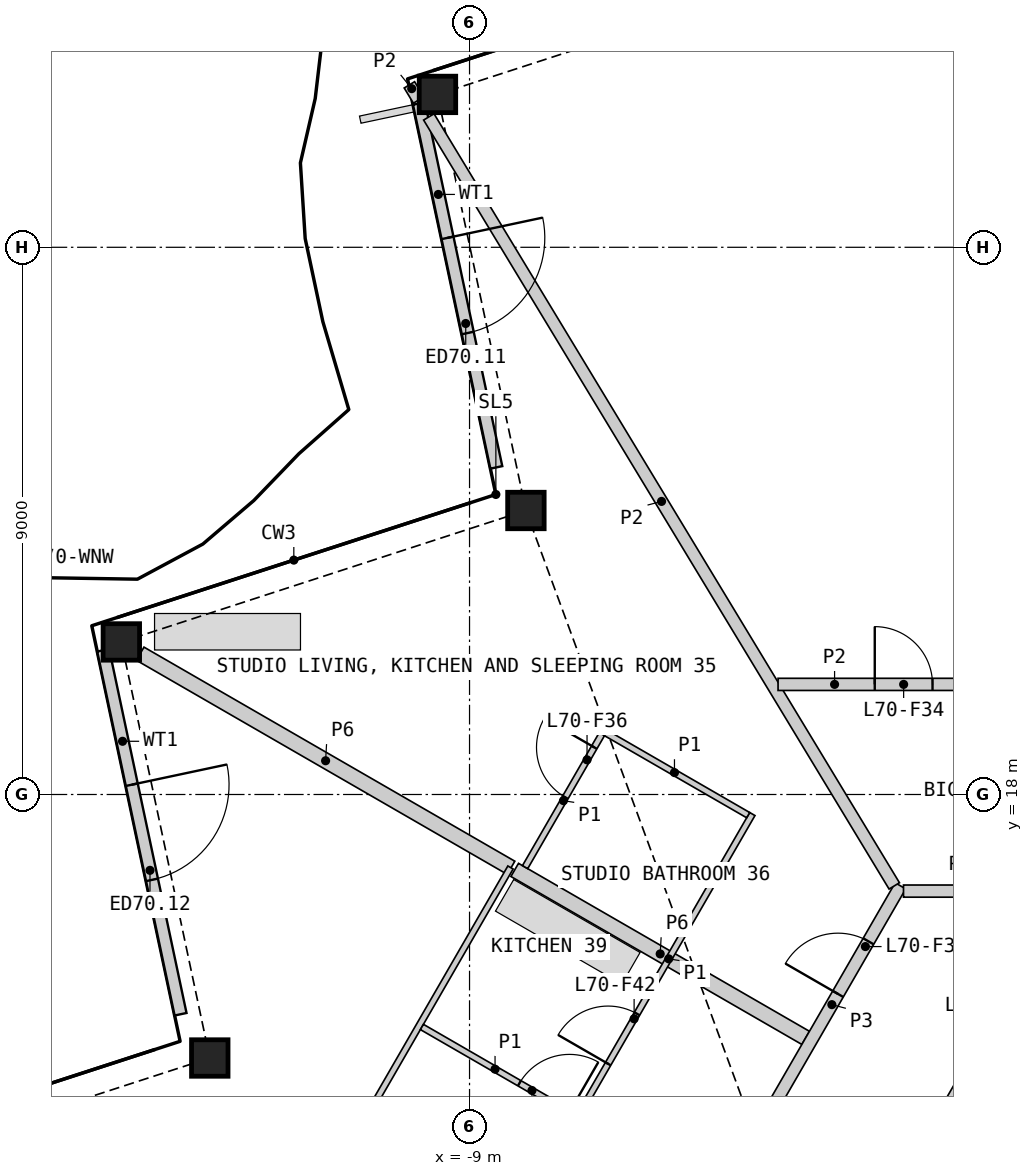
"""IFC4 building model, lengths in metres.
Left out: names, types, materials, properties, quantities, classifications, styles, units other than length and angle.
Written with IfcOpenShell. Run it as: python <this file> out.ifc"""

import sys

from ifc_helpers import new_model, si_unit, direction, frame, frame_2d, origin, origin_2d, place, context, subcontext, project, spatial, rectangle, hollow_rectangle, extrude, element, fill, save


model = new_model("IFC4")
c1 = context("Model", 3, precision=1e-05, world=origin(), true_north=direction((0.0, 1.0)))
c2 = subcontext(c1, "Body", "Model", "MODEL_VIEW")
j1 = project(units=[si_unit("LENGTHUNIT", "METRE"), si_unit("PLANEANGLEUNIT", "RADIAN")], contexts=[c1])
p1 = place(None, origin())
s1 = spatial("IfcSite", under=j1, at=p1, CompositionType="ELEMENT")
p2 = place(p1, origin())
s2 = spatial("IfcBuilding", under=s1, at=p2, CompositionType="ELEMENT")
p3 = place(p2, frame((0.0, 0.0, 318.8)))
s3 = spatial("IfcBuildingStorey", under=s2, at=p3, CompositionType="ELEMENT", Elevation=318.8)
for number, where, z_axis, x_axis in (
    (1, (-9.527, 29.514, 0.0), (0.0, 0.0, 1.0), (1.0, 0.0, 0.0)),
    (2, (-8.073, 22.671, 0.0), (0.0, 0.0, 1.0), (1.0, 0.0, 0.0)),
    (3, (-14.727, 20.509, 0.0), (0.0, 0.0, 1.0), (1.0, 0.0, 0.0)),
    (4, (-13.272, 13.666, 0.0), (0.0, 0.0, 1.0), (1.0, 0.0, 0.0)),
):
    element("IfcColumn", number, at=place(p3, frame(where, z_axis=z_axis, x_axis=x_axis)), inside=s3, PredefinedType="COLUMN", context=c2, shape_type="SweptSolid", body=[
        extrude(hollow_rectangle(XDim=0.6, YDim=0.6, WallThickness=0.04, at=origin_2d()), origin(), (0.0, 0.0, 1.0), 3.4),
    ])
p4 = place(p3, frame((-9.832, 29.366, 0.0), z_axis=(0.0, 0.0, 1.0), x_axis=(0.207932234858, -0.978143233738, 0.0)))
e5 = element("IfcWall", 5, at=p4, inside=s3, PredefinedType="SOLIDWALL", context=c2, shape_type="SweptSolid", body=[
    extrude(rectangle(XDim=6.12, YDim=0.2, at=frame_2d((3.06, 0.0))), origin(), (0.0, 0.0, 1.0), 2.488),
])
p5 = place(p4, frame((2.26, 0.0, 0.0)))
e6 = element("IfcOpeningElement", 6, at=p5, cuts=e5, PredefinedType="OPENING", context=c2, shape_type="SweptSolid", body=[
    extrude(rectangle(XDim=1.6, YDim=2.25, at=frame_2d((0.8, 1.125))), frame((0.0, 0.11, 0.0), z_axis=(0.0, -1.0, 0.0), x_axis=(1.0, 0.0, 0.0)), (0.0, 0.0, 1.0), 0.22),
])
p6 = place(p3, frame((-15.025, 20.372, 0.0), z_axis=(0.0, 0.0, 1.0), x_axis=(0.207932234858, -0.978143233738, 0.0)))
e7 = element("IfcWall", 7, at=p6, inside=s3, PredefinedType="SOLIDWALL", context=c2, shape_type="SweptSolid", body=[
    extrude(rectangle(XDim=6.12, YDim=0.2, at=frame_2d((3.06, 0.0))), origin(), (0.0, 0.0, 1.0), 2.488),
])
p7 = place(p6, frame((2.26, 0.0, 0.0)))
e8 = element("IfcOpeningElement", 8, at=p7, cuts=e7, PredefinedType="OPENING", context=c2, shape_type="SweptSolid", body=[
    extrude(rectangle(XDim=1.6, YDim=2.25, at=frame_2d((0.8, 1.125))), frame((0.0, 0.11, 0.0), z_axis=(0.0, -1.0, 0.0), x_axis=(1.0, 0.0, 0.0)), (0.0, 0.0, 1.0), 0.22),
])
p8 = place(p3, frame((-0.26, 13.961, 0.0), z_axis=(0.0, 0.0, 1.0), x_axis=(-0.49997936161, -0.866037319036, 0.0)))
e9 = element("IfcWall", 9, at=p8, inside=s3, PredefinedType="SHEAR", context=c2, shape_type="SweptSolid", body=[
    extrude(rectangle(XDim=2.66, YDim=0.6, at=frame_2d((1.33, 0.0))), origin(), (0.0, 0.0, 1.0), 3.1),
])
p9 = place(p8, frame((1.05, 0.0, 0.0)))
e10 = element("IfcOpeningElement", 10, at=p9, cuts=e9, PredefinedType="OPENING", context=c2, shape_type="SweptSolid", body=[
    extrude(rectangle(XDim=1.0, YDim=2.1, at=frame_2d((0.5, 1.05))), frame((0.0, 0.31, 0.0), z_axis=(0.0, -1.0, 0.0), x_axis=(1.0, 0.0, 0.0)), (0.0, 0.0, 1.0), 0.62),
])
p10 = place(p3, frame((-14.417, 20.316, 0.0), z_axis=(0.0, 0.0, 1.0), x_axis=(0.866022207469, -0.50000553614, 0.0)))
e11 = element("IfcWall", 11, at=p10, inside=s3, PredefinedType="PARTITIONING", context=c2, shape_type="SweptSolid", body=[
    extrude(rectangle(XDim=7.042, YDim=0.25, at=frame_2d((3.521, 0.0))), origin(), (0.0, 0.0, 1.0), 2.33),
])
p11 = place(p3, frame((-8.257, 16.76, 0.0), z_axis=(0.0, 0.0, 1.0), x_axis=(0.866034739526, -0.499983829672, 0.0)))
e12 = element("IfcWall", 12, at=p11, inside=s3, PredefinedType="PARTITIONING", context=c2, shape_type="SweptSolid", body=[
    extrude(rectangle(XDim=5.525, YDim=0.25, at=frame_2d((2.763, 0.0))), origin(), (0.0, 0.0, 1.0), 2.33),
])
p12 = place(p3, frame((-4.169, 12.59, 0.0), z_axis=(0.0, 0.0, 1.0), x_axis=(0.499950370306, 0.866054055606, 0.0)))
e13 = element("IfcWall", 13, at=p12, inside=s3, PredefinedType="PARTITIONING", context=c2, shape_type="SweptSolid", body=[
    extrude(rectangle(XDim=4.513, YDim=0.2, at=frame_2d((2.256, 0.0))), origin(), (0.0, 0.0, 1.0), 3.1),
])
p13 = place(p12, frame((2.459, 0.0, 0.0)))
e14 = element("IfcOpeningElement", 14, at=p13, cuts=e13, PredefinedType="OPENING", context=c2, shape_type="SweptSolid", body=[
    extrude(rectangle(XDim=1.0, YDim=2.1, at=frame_2d((0.5, 1.05))), frame((0.0, 0.11, 0.0), z_axis=(0.0, -1.0, 0.0), x_axis=(1.0, 0.0, 0.0)), (0.0, 0.0, 1.0), 0.22),
])
p14 = place(p3, frame((-1.863, 16.411, 0.0), z_axis=(0.0, 0.0, 1.0), x_axis=(1.0, 0.0, 0.0)))
e15 = element("IfcWall", 15, at=p14, inside=s3, PredefinedType="PARTITIONING", context=c2, shape_type="SweptSolid", body=[
    extrude(rectangle(XDim=3.726, YDim=0.2, at=frame_2d((1.863, 0.0))), origin(), (0.0, 0.0, 1.0), 3.1),
])
p15 = place(p14, frame((1.388, 0.0, 0.0)))
e16 = element("IfcOpeningElement", 16, at=p15, cuts=e15, PredefinedType="OPENING", context=c2, shape_type="SweptSolid", body=[
    extrude(rectangle(XDim=0.95, YDim=2.1, at=frame_2d((0.475, 1.05))), frame((0.0, 0.11, 0.0), z_axis=(0.0, -1.0, 0.0), x_axis=(1.0, 0.0, 0.0)), (0.0, 0.0, 1.0), 0.22),
])
p16 = place(p3, frame((-9.669, 29.144, 0.0), z_axis=(0.0, 0.0, 1.0), x_axis=(0.517770554559, -0.85551952218, 0.0)))
e17 = element("IfcWall", 17, at=p16, inside=s3, PredefinedType="PARTITIONING", context=c2, shape_type="SweptSolid", body=[
    extrude(rectangle(XDim=14.784, YDim=0.2, at=frame_2d((7.392, 0.0))), origin(), (0.0, 0.0, 1.0), 2.33),
])
p17 = place(p3, frame((-3.926, 19.811, 0.0), z_axis=(0.0, 0.0, 1.0), x_axis=(1.0, 0.0, 0.0)))
e18 = element("IfcWall", 18, at=p17, inside=s3, PredefinedType="PARTITIONING", context=c2, shape_type="SweptSolid", body=[
    extrude(rectangle(XDim=3.718, YDim=0.2, at=frame_2d((1.859, 0.0))), origin(), (0.0, 0.0, 1.0), 2.33),
])
p18 = place(p17, frame((1.59, 0.0, 0.0)))
e19 = element("IfcOpeningElement", 19, at=p18, cuts=e18, PredefinedType="OPENING", context=c2, shape_type="SweptSolid", body=[
    extrude(rectangle(XDim=0.95, YDim=2.1, at=frame_2d((0.475, 1.05))), frame((0.0, 0.11, 0.0), z_axis=(0.0, -1.0, 0.0), x_axis=(1.0, 0.0, 0.0)), (0.0, 0.0, 1.0), 0.22),
])
p19 = place(p3, frame((-9.989, 29.672, 0.0), z_axis=(0.0, 0.0, 1.0), x_axis=(0.517931387916, -0.855422163268, 0.0)))
e20 = element("IfcWall", 20, at=p19, inside=s3, PredefinedType="PARTITIONING", context=c2, shape_type="SweptSolid", body=[
    extrude(rectangle(XDim=0.292, YDim=0.2, at=frame_2d((0.146, 0.0))), origin(), (0.0, 0.0, 1.0), 2.33),
])
p20 = place(p3, frame((-13.544, 7.762, 0.0), z_axis=(0.0, 0.0, 1.0), x_axis=(0.499993819111, 0.866028972293, 0.0)))
e21 = element("IfcWall", 21, at=p20, inside=s3, PredefinedType="PARTITIONING", context=c2, shape_type="SweptSolid", body=[
    extrude(rectangle(XDim=10.436, YDim=0.1, at=frame_2d((5.218, 0.0))), origin(), (0.0, 0.0, 1.0), 2.33),
])
p21 = place(p20, frame((3.279, 0.0, 0.0)))
e22 = element("IfcOpeningElement", 22, at=p21, cuts=e21, PredefinedType="OPENING", context=c2, shape_type="SweptSolid", body=[
    extrude(rectangle(XDim=0.95, YDim=2.1, at=frame_2d((0.475, 1.05))), frame((0.0, 0.06, 0.0), z_axis=(0.0, -1.0, 0.0), x_axis=(1.0, 0.0, 0.0)), (0.0, 0.0, 1.0), 0.12),
])
p22 = place(p3, frame((-9.783, 14.177, 0.0), z_axis=(0.0, 0.0, 1.0), x_axis=(0.866030435321, -0.499991285022, 0.0)))
e23 = element("IfcWall", 23, at=p22, inside=s3, PredefinedType="PARTITIONING", context=c2, shape_type="SweptSolid", body=[
    extrude(rectangle(XDim=5.555, YDim=0.1, at=frame_2d((2.778, 0.0))), origin(), (0.0, 0.0, 1.0), 2.33),
])
p23 = place(p22, frame((1.852, 0.0, 0.0)))
e24 = element("IfcOpeningElement", 24, at=p23, cuts=e23, PredefinedType="OPENING", context=c2, shape_type="SweptSolid", body=[
    extrude(rectangle(XDim=0.95, YDim=2.1, at=frame_2d((0.475, 1.05))), frame((0.0, 0.06, 0.0), z_axis=(0.0, -1.0, 0.0), x_axis=(1.0, 0.0, 0.0)), (0.0, 0.0, 1.0), 0.12),
])
p24 = place(p3, frame((-7.099, 12.915, 0.0), z_axis=(0.0, 0.0, 1.0), x_axis=(0.49997732567, 0.866038494419, 0.0)))
e25 = element("IfcWall", 25, at=p24, inside=s3, PredefinedType="PARTITIONING", context=c2, shape_type="SweptSolid", body=[
    extrude(rectangle(XDim=5.5, YDim=0.1, at=frame_2d((2.75, 0.0))), origin(), (0.0, 0.0, 1.0), 2.33),
])
p25 = place(p24, frame((0.756, 0.0, 0.0)))
e26 = element("IfcOpeningElement", 26, at=p25, cuts=e25, PredefinedType="OPENING", context=c2, shape_type="SweptSolid", body=[
    extrude(rectangle(XDim=0.95, YDim=2.1, at=frame_2d((0.475, 1.05))), frame((0.0, 0.06, 0.0), z_axis=(0.0, -1.0, 0.0), x_axis=(1.0, 0.0, 0.0)), (0.0, 0.0, 1.0), 0.12),
])
p26 = place(p3, frame((-6.842, 19.06, 0.0), z_axis=(0.0, 0.0, 1.0), x_axis=(0.866034573852, -0.49998411664, 0.0)))
e27 = element("IfcWall", 27, at=p26, inside=s3, PredefinedType="PARTITIONING", context=c2, shape_type="SweptSolid", body=[
    extrude(rectangle(XDim=2.8, YDim=0.1, at=frame_2d((1.4, 0.0))), origin(), (0.0, 0.0, 1.0), 2.33),
])
p27 = place(p3, frame((-8.086, 16.805, 0.0), z_axis=(0.0, 0.0, 1.0), x_axis=(0.50001820224, 0.866014894461, 0.0)))
e28 = element("IfcWall", 28, at=p27, inside=s3, PredefinedType="PARTITIONING", context=c2, shape_type="SweptSolid", body=[
    extrude(rectangle(XDim=2.525, YDim=0.1, at=frame_2d((1.262, 0.0))), origin(), (0.0, 0.0, 1.0), 2.33),
])
p28 = place(p27, frame((1.325, 0.0, 0.0)))
e29 = element("IfcOpeningElement", 29, at=p28, cuts=e28, PredefinedType="OPENING", context=c2, shape_type="SweptSolid", body=[
    extrude(rectangle(XDim=0.95, YDim=2.1, at=frame_2d((0.475, 1.05))), frame((0.0, 0.06, 0.0), z_axis=(0.0, -1.0, 0.0), x_axis=(1.0, 0.0, 0.0)), (0.0, 0.0, 1.0), 0.12),
])
p29 = place(p5, origin())
e30 = element("IfcDoor", 30, at=p29, inside=s3, OperationType="DOUBLE_DOOR_SINGLE_SWING", PredefinedType="DOOR", context=c2, shape_type="SweptSolid", body=[
    extrude(rectangle(XDim=1.6, YDim=2.25, at=frame_2d((0.8, 1.125))), frame((0.0, 0.025, 0.0), z_axis=(0.0, -1.0, 0.0), x_axis=(1.0, 0.0, 0.0)), (0.0, 0.0, 1.0), 0.05),
])
fill(e6, e30)
p30 = place(p7, origin())
e31 = element("IfcDoor", 31, at=p30, inside=s3, OperationType="DOUBLE_DOOR_SINGLE_SWING", PredefinedType="DOOR", context=c2, shape_type="SweptSolid", body=[
    extrude(rectangle(XDim=1.6, YDim=2.25, at=frame_2d((0.8, 1.125))), frame((0.0, 0.025, 0.0), z_axis=(0.0, -1.0, 0.0), x_axis=(1.0, 0.0, 0.0)), (0.0, 0.0, 1.0), 0.05),
])
fill(e8, e31)
p31 = place(p18, origin())
e32 = element("IfcDoor", 32, at=p31, inside=s3, OperationType="SINGLE_SWING_LEFT", PredefinedType="DOOR", context=c2, shape_type="SweptSolid", body=[
    extrude(rectangle(XDim=0.95, YDim=2.1, at=frame_2d((0.475, 1.05))), frame((0.0, 0.025, 0.0), z_axis=(0.0, -1.0, 0.0), x_axis=(1.0, 0.0, 0.0)), (0.0, 0.0, 1.0), 0.05),
])
fill(e19, e32)
p32 = place(p13, origin())
e33 = element("IfcDoor", 33, at=p32, inside=s3, OperationType="SINGLE_SWING_LEFT", PredefinedType="DOOR", context=c2, shape_type="SweptSolid", body=[
    extrude(rectangle(XDim=1.0, YDim=2.1, at=frame_2d((0.5, 1.05))), frame((0.0, 0.025, 0.0), z_axis=(0.0, -1.0, 0.0), x_axis=(1.0, 0.0, 0.0)), (0.0, 0.0, 1.0), 0.05),
])
fill(e14, e33)
p33 = place(p28, origin())
e34 = element("IfcDoor", 34, at=p33, inside=s3, OperationType="SINGLE_SWING_RIGHT", PredefinedType="DOOR", context=c2, shape_type="SweptSolid", body=[
    extrude(rectangle(XDim=0.95, YDim=2.1, at=frame_2d((0.475, 1.05))), frame((0.0, 0.025, 0.0), z_axis=(0.0, -1.0, 0.0), x_axis=(1.0, 0.0, 0.0)), (0.0, 0.0, 1.0), 0.05),
])
fill(e29, e34)
p34 = place(p23, origin())
e35 = element("IfcDoor", 35, at=p34, inside=s3, OperationType="SINGLE_SWING_RIGHT", PredefinedType="DOOR", context=c2, shape_type="SweptSolid", body=[
    extrude(rectangle(XDim=0.95, YDim=2.1, at=frame_2d((0.475, 1.05))), frame((0.0, 0.025, 0.0), z_axis=(0.0, -1.0, 0.0), x_axis=(1.0, 0.0, 0.0)), (0.0, 0.0, 1.0), 0.05),
])
fill(e24, e35)
p35 = place(p25, origin())
e36 = element("IfcDoor", 36, at=p35, inside=s3, OperationType="SINGLE_SWING_LEFT", PredefinedType="DOOR", context=c2, shape_type="SweptSolid", body=[
    extrude(rectangle(XDim=0.95, YDim=2.1, at=frame_2d((0.475, 1.05))), frame((0.0, 0.025, 0.0), z_axis=(0.0, -1.0, 0.0), x_axis=(1.0, 0.0, 0.0)), (0.0, 0.0, 1.0), 0.05),
])
fill(e26, e36)
save(model, sys.argv[1])
